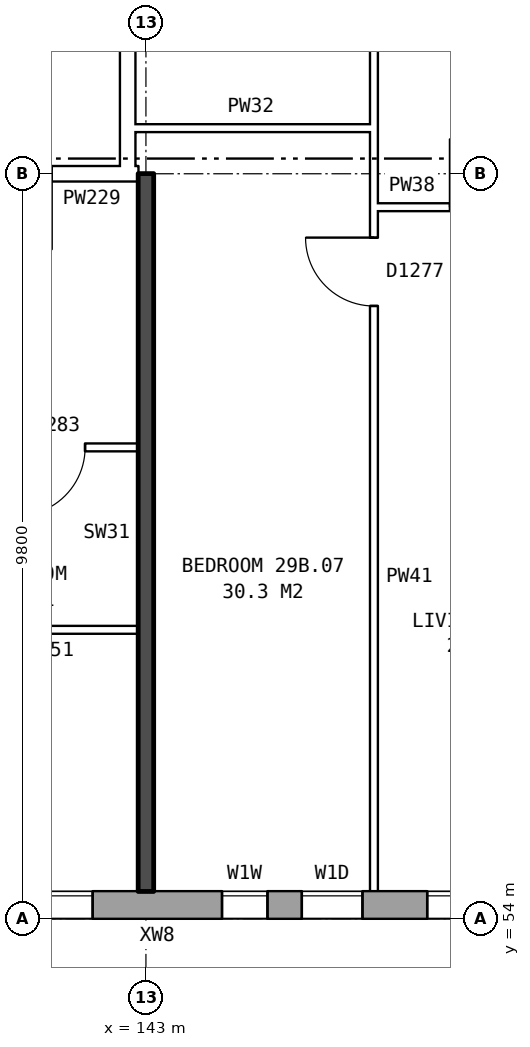
"""IFC4 building model, lengths in metres.
Left out: names, types, materials, properties, quantities, classifications, styles, units other than length and angle.
Written with IfcOpenShell. Run it as: python <this file> out.ifc"""

import sys

from ifc_helpers import new_model, si_unit, direction, frame, frame_2d, origin, place, context, subcontext, project, spatial, rectangle, extrude, element, fill, save


model = new_model("IFC4")
c1 = context("Model", 3, precision=1e-05, world=origin(), true_north=direction((0.0, 1.0)))
c2 = subcontext(c1, "Body", "Model", "MODEL_VIEW")
j1 = project(units=[si_unit("LENGTHUNIT", "METRE"), si_unit("PLANEANGLEUNIT", "RADIAN")], contexts=[c1])
p1 = place(None, origin())
s1 = spatial("IfcSite", under=j1, at=p1, CompositionType="ELEMENT")
p2 = place(p1, origin())
s2 = spatial("IfcBuilding", under=s1, at=p2, CompositionType="ELEMENT")
p3 = place(p2, frame((0.0, 0.0, 105.7)))
s3 = spatial("IfcBuildingStorey", under=s2, at=p3, CompositionType="ELEMENT", Elevation=105.7)
p4 = place(p3, frame((134.075, 54.18, 0.0), z_axis=(0.0, 0.0, 1.0), x_axis=(1.0, 0.0, 0.0)))
e1 = element("IfcWall", 1, at=p4, inside=s3, PredefinedType="STANDARD", context=c2, shape_type="SweptSolid", body=[
    extrude(rectangle(XDim=36.851, YDim=0.36, at=frame_2d((18.425, 0.0))), origin(), (0.0, 0.0, 1.0), 2.85),
])
p5 = place(p4, frame((0.625, 0.0, 0.8)))
e2 = element("IfcOpeningElement", 2, at=p5, cuts=e1, PredefinedType="OPENING", context=c2, shape_type="SweptSolid", body=[
    extrude(rectangle(XDim=1.6, YDim=1.8, at=frame_2d((0.8, 0.9))), frame((0.0, 0.19, 0.0), z_axis=(0.0, -1.0, 0.0), x_axis=(1.0, 0.0, 0.0)), (0.0, 0.0, 1.0), 0.38),
])
p6 = place(p4, frame((3.625, 0.0, 0.8)))
e3 = element("IfcOpeningElement", 3, at=p6, cuts=e1, PredefinedType="OPENING", context=c2, shape_type="SweptSolid", body=[
    extrude(rectangle(XDim=1.6, YDim=1.8, at=frame_2d((0.8, 0.9))), frame((0.0, 0.19, 0.0), z_axis=(0.0, -1.0, 0.0), x_axis=(1.0, 0.0, 0.0)), (0.0, 0.0, 1.0), 0.38),
])
p7 = place(p4, frame((6.625, 0.0, 0.8)))
e4 = element("IfcOpeningElement", 4, at=p7, cuts=e1, PredefinedType="OPENING", context=c2, shape_type="SweptSolid", body=[
    extrude(rectangle(XDim=1.6, YDim=1.8, at=frame_2d((0.8, 0.9))), frame((0.0, 0.19, 0.0), z_axis=(0.0, -1.0, 0.0), x_axis=(1.0, 0.0, 0.0)), (0.0, 0.0, 1.0), 0.38),
])
p8 = place(p4, frame((9.925, 0.0, 0.15)))
e5 = element("IfcOpeningElement", 5, at=p8, cuts=e1, PredefinedType="OPENING", context=c2, shape_type="SweptSolid", body=[
    extrude(rectangle(XDim=0.6, YDim=0.9, at=frame_2d((0.3, 0.45))), frame((0.0, 0.19, 0.0), z_axis=(0.0, -1.0, 0.0), x_axis=(1.0, 0.0, 0.0)), (0.0, 0.0, 1.0), 0.38),
])
p9 = place(p4, frame((12.625, 0.0, 0.8)))
e6 = element("IfcOpeningElement", 6, at=p9, cuts=e1, PredefinedType="OPENING", context=c2, shape_type="SweptSolid", body=[
    extrude(rectangle(XDim=1.6, YDim=1.8, at=frame_2d((0.8, 0.9))), frame((0.0, 0.19, 0.0), z_axis=(0.0, -1.0, 0.0), x_axis=(1.0, 0.0, 0.0)), (0.0, 0.0, 1.0), 0.38),
])
p10 = place(p4, frame((15.625, 0.0, 0.8)))
e7 = element("IfcOpeningElement", 7, at=p10, cuts=e1, PredefinedType="OPENING", context=c2, shape_type="SweptSolid", body=[
    extrude(rectangle(XDim=1.6, YDim=1.8, at=frame_2d((0.8, 0.9))), frame((0.0, 0.19, 0.0), z_axis=(0.0, -1.0, 0.0), x_axis=(1.0, 0.0, 0.0)), (0.0, 0.0, 1.0), 0.38),
])
p11 = place(p4, frame((18.625, 0.0, 0.8)))
e8 = element("IfcOpeningElement", 8, at=p11, cuts=e1, PredefinedType="OPENING", context=c2, shape_type="SweptSolid", body=[
    extrude(rectangle(XDim=1.6, YDim=1.8, at=frame_2d((0.8, 0.9))), frame((0.0, 0.19, 0.0), z_axis=(0.0, -1.0, 0.0), x_axis=(1.0, 0.0, 0.0)), (0.0, 0.0, 1.0), 0.38),
])
p12 = place(p4, frame((21.625, 0.0, 0.8)))
e9 = element("IfcOpeningElement", 9, at=p12, cuts=e1, PredefinedType="OPENING", context=c2, shape_type="SweptSolid", body=[
    extrude(rectangle(XDim=1.6, YDim=1.8, at=frame_2d((0.8, 0.9))), frame((0.0, 0.19, 0.0), z_axis=(0.0, -1.0, 0.0), x_axis=(1.0, 0.0, 0.0)), (0.0, 0.0, 1.0), 0.38),
])
p13 = place(p4, frame((23.525, 0.0, 0.8)))
e10 = element("IfcOpeningElement", 10, at=p13, cuts=e1, PredefinedType="OPENING", context=c2, shape_type="SweptSolid", body=[
    extrude(rectangle(XDim=1.6, YDim=1.8, at=frame_2d((0.8, 0.9))), frame((0.0, 0.19, 0.0), z_axis=(0.0, -1.0, 0.0), x_axis=(1.0, 0.0, 0.0)), (0.0, 0.0, 1.0), 0.38),
])
p14 = place(p4, frame((27.625, 0.0, 1.4)))
e11 = element("IfcOpeningElement", 11, at=p14, cuts=e1, PredefinedType="OPENING", context=c2, shape_type="SweptSolid", body=[
    extrude(rectangle(XDim=1.0, YDim=1.2, at=frame_2d((0.5, 0.6))), frame((0.0, 0.19, 0.0), z_axis=(0.0, -1.0, 0.0), x_axis=(1.0, 0.0, 0.0)), (0.0, 0.0, 1.0), 0.38),
])
p15 = place(p4, frame((30.625, 0.0, 0.8)))
e12 = element("IfcOpeningElement", 12, at=p15, cuts=e1, PredefinedType="OPENING", context=c2, shape_type="SweptSolid", body=[
    extrude(rectangle(XDim=1.6, YDim=1.8, at=frame_2d((0.8, 0.9))), frame((0.0, 0.19, 0.0), z_axis=(0.0, -1.0, 0.0), x_axis=(1.0, 0.0, 0.0)), (0.0, 0.0, 1.0), 0.38),
])
p16 = place(p4, frame((33.625, 0.0, 0.8)))
e13 = element("IfcOpeningElement", 13, at=p16, cuts=e1, PredefinedType="OPENING", context=c2, shape_type="SweptSolid", body=[
    extrude(rectangle(XDim=1.6, YDim=1.8, at=frame_2d((0.8, 0.9))), frame((0.0, 0.19, 0.0), z_axis=(0.0, -1.0, 0.0), x_axis=(1.0, 0.0, 0.0)), (0.0, 0.0, 1.0), 0.38),
])
p17 = place(p4, frame((10.975, 0.0, 0.15)))
e14 = element("IfcOpeningElement", 14, at=p17, cuts=e1, PredefinedType="OPENING", context=c2, shape_type="SweptSolid", body=[
    extrude(rectangle(XDim=0.8, YDim=1.8, at=frame_2d((0.4, 0.9))), frame((0.0, 0.19, 0.0), z_axis=(0.0, -1.0, 0.0), x_axis=(1.0, 0.0, 0.0)), (0.0, 0.0, 1.0), 0.38),
])
p18 = place(p4, frame((25.425, 0.0, 0.8)))
e15 = element("IfcOpeningElement", 15, at=p18, cuts=e1, PredefinedType="OPENING", context=c2, shape_type="SweptSolid", body=[
    extrude(rectangle(XDim=0.6, YDim=0.9, at=frame_2d((0.3, 0.45))), frame((0.0, 0.19, 0.0), z_axis=(0.0, -1.0, 0.0), x_axis=(1.0, 0.0, 0.0)), (0.0, 0.0, 1.0), 0.38),
])
p19 = place(p4, frame((28.925, 0.0, 0.8)))
e16 = element("IfcOpeningElement", 16, at=p19, cuts=e1, PredefinedType="OPENING", context=c2, shape_type="SweptSolid", body=[
    extrude(rectangle(XDim=1.4, YDim=1.8, at=frame_2d((0.7, 0.9))), frame((0.0, 0.19, 0.0), z_axis=(0.0, -1.0, 0.0), x_axis=(1.0, 0.0, 0.0)), (0.0, 0.0, 1.0), 0.38),
])
p20 = place(p3, frame((142.76, 63.9, 0.0), z_axis=(0.0, 0.0, 1.0), x_axis=(0.0, 1.0, 0.0)))
e17 = element("IfcWall", 17, at=p20, inside=s3, PredefinedType="PARTITIONING", context=c2, shape_type="SweptSolid", body=[
    extrude(rectangle(XDim=12.2, YDim=0.2, at=frame_2d((6.1, 0.0))), origin(), (0.0, 0.0, 1.0), 2.85),
])
p21 = place(p20, frame((5.1, 0.0, 0.0)))
e18 = element("IfcOpeningElement", 18, at=p21, cuts=e17, PredefinedType="OPENING", context=c2, shape_type="SweptSolid", body=[
    extrude(rectangle(XDim=2.0, YDim=2.1, at=frame_2d((1.0, 1.05))), frame((0.0, 0.11, 0.0), z_axis=(0.0, -1.0, 0.0), x_axis=(1.0, 0.0, 0.0)), (0.0, 0.0, 1.0), 0.22),
])
p22 = place(p3, frame((140.6, 57.8, 0.0), z_axis=(0.0, 0.0, 1.0), x_axis=(1.0, 0.0, 0.0)))
e19 = element("IfcWall", 19, at=p22, inside=s3, PredefinedType="PARTITIONING", context=c2, shape_type="SweptSolid", body=[
    extrude(rectangle(XDim=2.3, YDim=0.1, at=frame_2d((1.15, 0.0))), origin(), (0.0, 0.0, 1.0), 2.85),
])
p23 = place(p3, frame((137.1, 60.2, 0.0), z_axis=(0.0, 0.0, 1.0), x_axis=(1.0, 0.0, 0.0)))
e20 = element("IfcWall", 20, at=p23, inside=s3, PredefinedType="PARTITIONING", context=c2, shape_type="SweptSolid", body=[
    extrude(rectangle(XDim=5.8, YDim=0.1, at=frame_2d((2.9, 0.0))), origin(), (0.0, 0.0, 1.0), 2.85),
])
p24 = place(p23, frame((1.3, 0.0, 0.0)))
e21 = element("IfcOpeningElement", 21, at=p24, cuts=e20, PredefinedType="OPENING", context=c2, shape_type="SweptSolid", body=[
    extrude(rectangle(XDim=0.9, YDim=2.1, at=frame_2d((0.45, 1.05))), frame((0.0, 0.06, 0.0), z_axis=(0.0, -1.0, 0.0), x_axis=(1.0, 0.0, 0.0)), (0.0, 0.0, 1.0), 0.12),
])
p25 = place(p23, frame((4.2, 0.0, 0.0)))
e22 = element("IfcOpeningElement", 22, at=p25, cuts=e20, PredefinedType="OPENING", context=c2, shape_type="SweptSolid", body=[
    extrude(rectangle(XDim=0.9, YDim=2.1, at=frame_2d((0.45, 1.05))), frame((0.0, 0.06, 0.0), z_axis=(0.0, -1.0, 0.0), x_axis=(1.0, 0.0, 0.0)), (0.0, 0.0, 1.0), 0.12),
])
p26 = place(p3, frame((146.0, 63.36, 0.0), z_axis=(0.0, 0.0, 1.0), x_axis=(1.0, 0.0, 0.0)))
e23 = element("IfcWall", 23, at=p26, inside=s3, PredefinedType="PARTITIONING", context=c2, shape_type="SweptSolid", body=[
    extrude(rectangle(XDim=2.9, YDim=0.1, at=frame_2d((1.45, 0.0))), origin(), (0.0, 0.0, 1.0), 2.85),
])
p27 = place(p26, frame((1.0, 0.0, 0.0)))
e24 = element("IfcOpeningElement", 24, at=p27, cuts=e23, PredefinedType="OPENING", context=c2, shape_type="SweptSolid", body=[
    extrude(rectangle(XDim=0.9, YDim=2.1, at=frame_2d((0.45, 1.05))), frame((0.0, 0.06, 0.0), z_axis=(0.0, -1.0, 0.0), x_axis=(1.0, 0.0, 0.0)), (0.0, 0.0, 1.0), 0.12),
])
p28 = place(p3, frame((139.76, 63.8, 0.0), z_axis=(0.0, 0.0, 1.0), x_axis=(1.0, 0.0, 0.0)))
e25 = element("IfcWall", 25, at=p28, inside=s3, PredefinedType="PARTITIONING", context=c2, shape_type="SweptSolid", body=[
    extrude(rectangle(XDim=3.0, YDim=0.2, at=frame_2d((1.5, 0.0))), origin(), (0.0, 0.0, 1.0), 2.85),
])
p29 = place(p28, frame((1.0, 0.0, 0.0)))
e26 = element("IfcOpeningElement", 26, at=p29, cuts=e25, PredefinedType="OPENING", context=c2, shape_type="SweptSolid", body=[
    extrude(rectangle(XDim=1.0, YDim=2.1, at=frame_2d((0.5, 1.05))), frame((0.0, 0.11, 0.0), z_axis=(0.0, -1.0, 0.0), x_axis=(1.0, 0.0, 0.0)), (0.0, 0.0, 1.0), 0.22),
])
p30 = place(p3, frame((142.76, 63.8, 0.0), z_axis=(0.0, 0.0, 1.0), x_axis=(1.0, 0.0, 0.0)))
e27 = element("IfcWall", 27, at=p30, inside=s3, PredefinedType="PARTITIONING", context=c2, shape_type="SweptSolid", body=[
    extrude(rectangle(XDim=0.14, YDim=0.2, at=frame_2d((0.07, 0.0))), origin(), (0.0, 0.0, 1.0), 2.85),
])
p31 = place(p3, frame((142.76, 64.4, 0.0), z_axis=(0.0, 0.0, 1.0), x_axis=(1.0, 0.0, 0.0)))
e28 = element("IfcWall", 28, at=p31, inside=s3, PredefinedType="PARTITIONING", context=c2, shape_type="SweptSolid", body=[
    extrude(rectangle(XDim=3.24, YDim=0.1, at=frame_2d((1.62, 0.0))), origin(), (0.0, 0.0, 1.0), 2.85),
])
p32 = place(p3, frame((143.0, 54.36, 0.0), z_axis=(0.0, 0.0, 1.0), x_axis=(0.0, 1.0, 0.0)))
e29 = element("IfcWall", 29, at=p32, inside=s3, PredefinedType="SOLIDWALL", context=c2, shape_type="SweptSolid", body=[
    extrude(rectangle(XDim=9.44, YDim=0.2, at=frame_2d((4.72, 0.0))), origin(), (0.0, 0.0, 1.0), 2.85),
])
p33 = place(p3, frame((146.0, 54.36, 0.0), z_axis=(0.0, 0.0, 1.0), x_axis=(0.0, 1.0, 0.0)))
e30 = element("IfcWall", 30, at=p33, inside=s3, PredefinedType="PARTITIONING", context=c2, shape_type="SweptSolid", body=[
    extrude(rectangle(XDim=14.34, YDim=0.1, at=frame_2d((7.17, 0.0))), origin(), (0.0, 0.0, 1.0), 2.85),
])
p34 = place(p33, frame((7.7, 0.0, 0.0)))
e31 = element("IfcOpeningElement", 31, at=p34, cuts=e30, PredefinedType="OPENING", context=c2, shape_type="SweptSolid", body=[
    extrude(rectangle(XDim=0.9, YDim=2.1, at=frame_2d((0.45, 1.05))), frame((0.0, 0.06, 0.0), z_axis=(0.0, -1.0, 0.0), x_axis=(1.0, 0.0, 0.0)), (0.0, 0.0, 1.0), 0.12),
])
p35 = place(p33, frame((13.04, 0.0, 0.0)))
e32 = element("IfcOpeningElement", 32, at=p35, cuts=e30, PredefinedType="OPENING", context=c2, shape_type="SweptSolid", body=[
    extrude(rectangle(XDim=0.9, YDim=2.1, at=frame_2d((0.45, 1.05))), frame((0.0, 0.06, 0.0), z_axis=(0.0, -1.0, 0.0), x_axis=(1.0, 0.0, 0.0)), (0.0, 0.0, 1.0), 0.12),
])
p36 = place(p7, origin())
e33 = element("IfcWindow", 33, at=p36, inside=s3, PartitioningType="SINGLE_PANEL", PredefinedType="WINDOW", context=c2, shape_type="SweptSolid", body=[
    extrude(rectangle(XDim=1.6, YDim=1.8, at=frame_2d((0.8, 0.9))), frame((0.0, 0.15, 0.0), z_axis=(0.0, -1.0, 0.0), x_axis=(1.0, 0.0, 0.0)), (0.0, 0.0, 1.0), 0.06),
])
fill(e4, e33)
p37 = place(p8, origin())
e34 = element("IfcWindow", 34, at=p37, inside=s3, PartitioningType="SINGLE_PANEL", PredefinedType="WINDOW", context=c2, shape_type="SweptSolid", body=[
    extrude(rectangle(XDim=0.6, YDim=0.9, at=frame_2d((0.3, 0.45))), frame((0.0, 0.15, 0.0), z_axis=(0.0, -1.0, 0.0), x_axis=(1.0, 0.0, 0.0)), (0.0, 0.0, 1.0), 0.06),
])
fill(e5, e34)
p38 = place(p9, origin())
e35 = element("IfcWindow", 35, at=p38, inside=s3, PartitioningType="SINGLE_PANEL", PredefinedType="WINDOW", context=c2, shape_type="SweptSolid", body=[
    extrude(rectangle(XDim=1.6, YDim=1.8, at=frame_2d((0.8, 0.9))), frame((0.0, 0.15, 0.0), z_axis=(0.0, -1.0, 0.0), x_axis=(1.0, 0.0, 0.0)), (0.0, 0.0, 1.0), 0.06),
])
fill(e6, e35)
p39 = place(p25, frame((0.9, 0.0, 0.0), z_axis=(0.0, 0.0, 1.0), x_axis=(-1.0, 0.0, 0.0)))
e36 = element("IfcDoor", 36, at=p39, inside=s3, OperationType="SINGLE_SWING_RIGHT", PredefinedType="DOOR", context=c2, shape_type="SweptSolid", body=[
    extrude(rectangle(XDim=0.9, YDim=2.1, at=frame_2d((0.45, 1.05))), frame((0.0, 0.025, 0.0), z_axis=(0.0, -1.0, 0.0), x_axis=(1.0, 0.0, 0.0)), (0.0, 0.0, 1.0), 0.05),
])
fill(e22, e36)
p40 = place(p34, origin())
e37 = element("IfcDoor", 37, at=p40, inside=s3, OperationType="SINGLE_SWING_RIGHT", PredefinedType="DOOR", context=c2, shape_type="SweptSolid", body=[
    extrude(rectangle(XDim=0.9, YDim=2.1, at=frame_2d((0.45, 1.05))), frame((0.0, 0.025, 0.0), z_axis=(0.0, -1.0, 0.0), x_axis=(1.0, 0.0, 0.0)), (0.0, 0.0, 1.0), 0.05),
])
fill(e31, e37)
p41 = place(p17, origin())
e38 = element("IfcWindow", 38, at=p41, inside=s3, PartitioningType="SINGLE_PANEL", PredefinedType="WINDOW", context=c2, shape_type="SweptSolid", body=[
    extrude(rectangle(XDim=0.8, YDim=1.8, at=frame_2d((0.4, 0.9))), frame((0.0, 0.15, 0.0), z_axis=(0.0, -1.0, 0.0), x_axis=(1.0, 0.0, 0.0)), (0.0, 0.0, 1.0), 0.06),
])
fill(e14, e38)
save(model, sys.argv[1])
